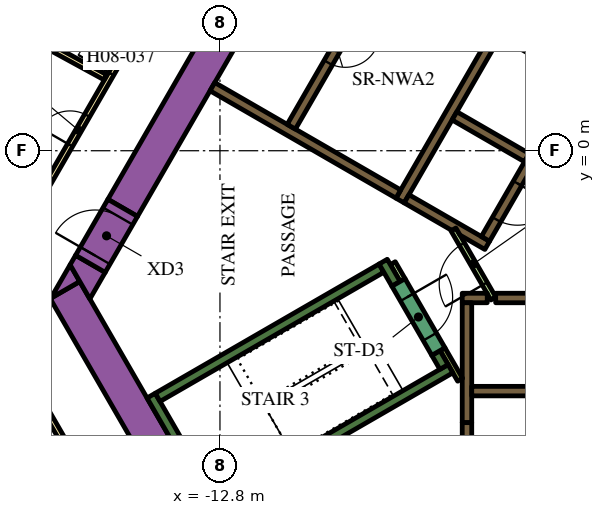
"""IFC4 building model, lengths in metres.
Left out: names, types, materials, properties, quantities, classifications, styles, units other than length and angle.
Written with IfcOpenShell. Run it as: python <this file> out.ifc"""

import sys

from ifc_helpers import new_model, si_unit, direction, frame, frame_2d, origin, place, context, subcontext, project, spatial, polyline, rectangle, outline, extrude, element, fill, save


model = new_model("IFC4")
c1 = context("Model", 3, precision=1e-05, world=origin(), true_north=direction((0.0, 1.0)))
c2 = subcontext(c1, "Body", "Model", "MODEL_VIEW")
j1 = project(units=[si_unit("LENGTHUNIT", "METRE"), si_unit("PLANEANGLEUNIT", "RADIAN")], contexts=[c1])
p1 = place(None, origin())
s1 = spatial("IfcSite", under=j1, at=p1, CompositionType="ELEMENT")
p2 = place(p1, origin())
s2 = spatial("IfcBuilding", under=s1, at=p2, CompositionType="ELEMENT")
p3 = place(p2, frame((0.0, 0.0, 107.1)))
s3 = spatial("IfcBuildingStorey", under=s2, at=p3, CompositionType="ELEMENT", Elevation=107.1)
p4 = place(p3, frame((-15.36, -1.503, 0.0), z_axis=(0.0, 0.0, 1.0), x_axis=(0.50000389221, 0.866023156604, 0.0)))
e1 = element("IfcWall", 1, at=p4, inside=s3, PredefinedType="SOLIDWALL", context=c2, shape_type="SweptSolid", body=[
    extrude(rectangle(XDim=21.0, YDim=0.9, at=frame_2d((10.5, 0.0))), origin(), (0.0, 0.0, 1.0), 3.9),
])
p5 = place(p3, frame((-12.134, -11.883, 0.0), z_axis=(0.0, 0.0, 1.0), x_axis=(-0.500005339912, 0.866022320763, 0.0)))
e2 = element("IfcWall", 2, at=p5, inside=s3, PredefinedType="SOLIDWALL", context=c2, shape_type="SweptSolid", body=[
    extrude(rectangle(XDim=9.488, YDim=0.9, at=frame_2d((4.744, 0.0))), origin(), (0.0, 0.0, 1.0), 3.9),
])
p6 = place(p3, origin())
e3 = element("IfcWall", 3, at=p6, inside=s3, PredefinedType="SOLIDWALL", context=c2, shape_type="SweptSolid", body=[
    extrude(outline(polyline([(-16.489, -3.44), (-17.251, -3.88), (-16.743, -3.0), (-16.489, -3.44)])), origin(), (0.0, 0.0, 1.0), 3.9),
])
e4 = element("IfcWall", 4, at=p6, inside=s3, PredefinedType="SOLIDWALL", context=c2, shape_type="SweptSolid", body=[
    extrude(outline(polyline([(-15.82, -3.201), (-16.223, -3.9), (-16.743, -3.0), (-16.599, -2.751), (-15.82, -3.201)])), origin(), (0.0, 0.0, 1.0), 3.9),
])
p7 = place(p3, frame((-12.885, -9.431, 0.0), z_axis=(0.0, 0.0, 1.0), x_axis=(-0.500020560727, 0.866013532718, 0.0)))
e5 = element("IfcWall", 5, at=p7, inside=s3, PredefinedType="SOLIDWALL", context=c2, shape_type="SweptSolid", body=[
    extrude(rectangle(XDim=3.45, YDim=0.25, at=frame_2d((1.725, 0.0))), origin(), (0.0, 0.0, 1.0), 3.9),
])
p8 = place(p3, frame((-14.44, -6.49, 0.0), z_axis=(0.0, 0.0, 1.0), x_axis=(0.866022966069, 0.500004222222, 0.0)))
e6 = element("IfcWall", 6, at=p8, inside=s3, PredefinedType="SOLIDWALL", context=c2, shape_type="SweptSolid", body=[
    extrude(rectangle(XDim=6.8, YDim=0.25, at=frame_2d((3.4, 0.0))), origin(), (0.0, 0.0, 1.0), 3.9),
])
p9 = place(p3, frame((-8.168, -3.503, 0.0), z_axis=(0.0, 0.0, 1.0), x_axis=(-0.499952099219, 0.866053057547, 0.0)))
e7 = element("IfcWall", 7, at=p9, inside=s3, PredefinedType="SOLIDWALL", context=c2, shape_type="SweptSolid", body=[
    extrude(rectangle(XDim=0.675, YDim=0.25, at=frame_2d((0.337, 0.0))), origin(), (0.0, 0.0, 1.0), 3.9),
])
p10 = place(p3, frame((-12.84, -9.261, 0.0), z_axis=(0.0, 0.0, 1.0), x_axis=(0.866016039709, 0.500016218704, 0.0)))
e8 = element("IfcWall", 8, at=p10, inside=s3, PredefinedType="SOLIDWALL", context=c2, shape_type="SweptSolid", body=[
    extrude(rectangle(XDim=7.05, YDim=0.25, at=frame_2d((3.525, 0.0))), origin(), (0.0, 0.0, 1.0), 3.9),
])
p11 = place(p3, frame((-6.905, -5.69, 0.0), z_axis=(0.0, 0.0, 1.0), x_axis=(-0.500402024738, 0.865793170242, 0.0)))
e9 = element("IfcWall", 9, at=p11, inside=s3, PredefinedType="SOLIDWALL", context=c2, shape_type="SweptSolid", body=[
    extrude(rectangle(XDim=0.425, YDim=0.25, at=frame_2d((0.212, 0.0))), origin(), (0.0, 0.0, 1.0), 3.9),
])
p12 = place(p3, frame((-5.545, -3.875, 0.0), z_axis=(0.0, 0.0, 1.0), x_axis=(1.0, 0.0, 0.0)))
e10 = element("IfcWall", 10, at=p12, inside=s3, PredefinedType="SOLIDWALL", context=c2, shape_type="SweptSolid", body=[
    extrude(rectangle(XDim=11.97, YDim=0.25, at=frame_2d((5.985, 0.0))), origin(), (0.0, 0.0, 1.0), 3.9),
])
p13 = place(p3, frame((-6.425, -3.875, 0.0), z_axis=(0.0, 0.0, 1.0), x_axis=(1.0, 0.0, 0.0)))
e11 = element("IfcWall", 11, at=p13, inside=s3, PredefinedType="SOLIDWALL", context=c2, shape_type="SweptSolid", body=[
    extrude(rectangle(XDim=0.658, YDim=0.25, at=frame_2d((0.329, 0.0))), origin(), (0.0, 0.0, 1.0), 3.9),
])
p14 = place(p3, frame((-6.3, -4.0, 0.0), z_axis=(0.0, 0.0, 1.0), x_axis=(0.0, -1.0, 0.0)))
e12 = element("IfcWall", 12, at=p14, inside=s3, PredefinedType="SOLIDWALL", context=c2, shape_type="SweptSolid", body=[
    extrude(rectangle(XDim=3.154, YDim=0.25, at=frame_2d((1.577, 0.0))), origin(), (0.0, 0.0, 1.0), 3.9),
])
p15 = place(p3, frame((-8.06, -1.311, 0.0), z_axis=(0.0, 0.0, 1.0), x_axis=(0.50000273126, 0.866023826885, 0.0)))
e13 = element("IfcWall", 13, at=p15, inside=s3, PredefinedType="SOLIDWALL", context=c2, shape_type="SweptSolid", body=[
    extrude(rectangle(XDim=10.33, YDim=0.25, at=frame_2d((5.165, 0.0))), origin(), (0.0, 0.0, 1.0), 3.9),
])
for number, where, z_axis, x_axis in (
    (14, (-5.369, 3.1, 0.0), (0.0, 0.0, 1.0), (0.866, -0.5, 0.0)),
    (15, (-4.724, -0.182, 0.0), (0.0, 0.0, 1.0), (-0.866, 0.5, 0.0)),
):
    element("IfcWall", number, at=place(p3, frame(where, z_axis=z_axis, x_axis=x_axis)), inside=s3, PredefinedType="SOLIDWALL", context=c2, shape_type="SweptSolid", body=[
        extrude(rectangle(XDim=2.2, YDim=0.25, at=frame_2d((1.1, 0.0))), origin(), (0.0, 0.0, 1.0), 3.9),
    ])
e16 = element("IfcWall", 16, at=p6, inside=s3, PredefinedType="SOLIDWALL", context=c2, shape_type="SweptSolid", body=[
    extrude(outline(polyline([(-5.922, -2.257), (-5.922, -2.257), (-5.705, -2.382), (-5.83, -2.598), (-6.483, -2.221), (-6.591, -2.033), (-6.591, -2.033), (-6.7, -2.096), (-7.952, -1.373), (-7.827, -1.156), (-5.922, -2.257)])), origin(), (0.0, 0.0, 1.0), 3.9),
])
p16 = place(p3, frame((-8.106, -1.14, 0.0), z_axis=(0.0, 0.0, 1.0), x_axis=(-0.866000643155, 0.500042884217, 0.0)))
e17 = element("IfcWall", 17, at=p16, inside=s3, PredefinedType="SOLIDWALL", context=c2, shape_type="SweptSolid", body=[
    extrude(rectangle(XDim=5.65, YDim=0.25, at=frame_2d((2.825, 0.0))), origin(), (0.0, 0.0, 1.0), 3.9),
])
p17 = place(p3, frame((-6.48, -6.027, 0.0), z_axis=(0.0, 0.0, 1.0), x_axis=(-0.499927229454, 0.866067413802, 0.0)))
e18 = element("IfcWall", 18, at=p17, inside=s3, PredefinedType="PARTITIONING", context=c2, shape_type="SweptSolid", body=[
    extrude(rectangle(XDim=0.929, YDim=0.15, at=frame_2d((0.464, 0.0))), origin(), (0.0, 0.0, 1.0), 3.9),
])
p18 = place(p3, frame((-8.252, -2.958, 0.0), z_axis=(0.0, 0.0, 1.0), x_axis=(0.500174715838, -0.865924508047, 0.0)))
e19 = element("IfcWall", 19, at=p18, inside=s3, PredefinedType="PARTITIONING", context=c2, shape_type="SweptSolid", body=[
    extrude(rectangle(XDim=0.514, YDim=0.15, at=frame_2d((0.257, 0.0))), origin(), (0.0, 0.0, 1.0), 2.75),
])
p19 = place(p3, frame((-6.175, -6.325, 0.0), z_axis=(0.0, 0.0, 1.0), x_axis=(1.0, 0.0, 0.0)))
e20 = element("IfcWall", 20, at=p19, inside=s3, PredefinedType="SOLIDWALL", context=c2, shape_type="SweptSolid", body=[
    extrude(rectangle(XDim=12.35, YDim=0.25, at=frame_2d((6.175, 0.0))), origin(), (0.0, 0.0, 1.0), 3.9),
])
p20 = place(p19, frame((3.205, 0.0, 0.0)))
e21 = element("IfcOpeningElement", 21, at=p20, cuts=e20, PredefinedType="OPENING", context=c2, shape_type="SweptSolid", body=[
    extrude(rectangle(XDim=0.9, YDim=2.1, at=frame_2d((0.45, 1.05))), frame((0.0, 0.135, 0.0), z_axis=(0.0, -1.0, 0.0), x_axis=(1.0, 0.0, 0.0)), (0.0, 0.0, 1.0), 0.27),
])
p21 = place(p19, frame((8.145, 0.0, 0.0)))
e22 = element("IfcOpeningElement", 22, at=p21, cuts=e20, PredefinedType="OPENING", context=c2, shape_type="SweptSolid", body=[
    extrude(rectangle(XDim=1.1, YDim=2.1, at=frame_2d((0.55, 1.05))), frame((0.0, 0.135, 0.0), z_axis=(0.0, -1.0, 0.0), x_axis=(1.0, 0.0, 0.0)), (0.0, 0.0, 1.0), 0.27),
])
p22 = place(p19, frame((10.665, 0.0, 0.0)))
e23 = element("IfcOpeningElement", 23, at=p22, cuts=e20, PredefinedType="OPENING", context=c2, shape_type="SweptSolid", body=[
    extrude(rectangle(XDim=1.1, YDim=2.1, at=frame_2d((0.55, 1.05))), frame((0.0, 0.135, 0.0), z_axis=(0.0, -1.0, 0.0), x_axis=(1.0, 0.0, 0.0)), (0.0, 0.0, 1.0), 0.27),
])
p23 = place(p3, frame((-6.008, 9.144, 0.0), z_axis=(0.0, 0.0, 1.0), x_axis=(-0.500006956611, -0.866021387346, 0.0)))
e24 = element("IfcWall", 24, at=p23, inside=s3, PredefinedType="SOLIDWALL", context=c2, shape_type="SweptSolid", body=[
    extrude(rectangle(XDim=9.83, YDim=0.25, at=frame_2d((4.915, 0.0))), origin(), (0.0, 0.0, 1.0), 3.9),
])
p24 = place(p23, frame((6.985, 0.0, 0.0)))
e25 = element("IfcOpeningElement", 25, at=p24, cuts=e24, PredefinedType="OPENING", context=c2, shape_type="SweptSolid", body=[
    extrude(rectangle(XDim=0.9, YDim=2.1, at=frame_2d((0.45, 1.05))), frame((0.0, 0.135, 0.0), z_axis=(0.0, -1.0, 0.0), x_axis=(1.0, 0.0, 0.0)), (0.0, 0.0, 1.0), 0.27),
])
p25 = place(p3, frame((-0.898, 6.194, 0.0), z_axis=(0.0, 0.0, 1.0), x_axis=(-0.499996202215, -0.866027596426, 0.0)))
e26 = element("IfcWall", 26, at=p25, inside=s3, PredefinedType="SOLIDWALL", context=c2, shape_type="SweptSolid", body=[
    extrude(rectangle(XDim=9.83, YDim=0.25, at=frame_2d((4.915, 0.0))), origin(), (0.0, 0.0, 1.0), 3.9),
])
p26 = place(p25, frame((0.585, 0.0, 0.0)))
e27 = element("IfcOpeningElement", 27, at=p26, cuts=e26, PredefinedType="OPENING", context=c2, shape_type="SweptSolid", body=[
    extrude(rectangle(XDim=1.1, YDim=2.1, at=frame_2d((0.55, 1.05))), frame((0.0, 0.135, 0.0), z_axis=(0.0, -1.0, 0.0), x_axis=(1.0, 0.0, 0.0)), (0.0, 0.0, 1.0), 0.27),
])
p27 = place(p25, frame((3.105, 0.0, 0.0)))
e28 = element("IfcOpeningElement", 28, at=p27, cuts=e26, PredefinedType="OPENING", context=c2, shape_type="SweptSolid", body=[
    extrude(rectangle(XDim=1.1, YDim=2.1, at=frame_2d((0.55, 1.05))), frame((0.0, 0.135, 0.0), z_axis=(0.0, -1.0, 0.0), x_axis=(1.0, 0.0, 0.0)), (0.0, 0.0, 1.0), 0.27),
])
p28 = place(p25, frame((5.625, 0.0, 0.0)))
e29 = element("IfcOpeningElement", 29, at=p28, cuts=e26, PredefinedType="OPENING", context=c2, shape_type="SweptSolid", body=[
    extrude(rectangle(XDim=1.1, YDim=2.1, at=frame_2d((0.55, 1.05))), frame((0.0, 0.135, 0.0), z_axis=(0.0, -1.0, 0.0), x_axis=(1.0, 0.0, 0.0)), (0.0, 0.0, 1.0), 0.27),
])
p29 = place(p25, frame((8.145, 0.0, 0.0)))
e30 = element("IfcOpeningElement", 30, at=p29, cuts=e26, PredefinedType="OPENING", context=c2, shape_type="SweptSolid", body=[
    extrude(rectangle(XDim=1.1, YDim=2.1, at=frame_2d((0.55, 1.05))), frame((0.0, 0.135, 0.0), z_axis=(0.0, -1.0, 0.0), x_axis=(1.0, 0.0, 0.0)), (0.0, 0.0, 1.0), 0.27),
])
p30 = place(p3, frame((-8.103, -3.466, 0.0), z_axis=(0.0, 0.0, 1.0), x_axis=(0.500078061341, -0.865980330357, 0.0)))
e31 = element("IfcWall", 31, at=p30, inside=s3, PredefinedType="SOLIDWALL", context=c2, shape_type="SweptSolid", body=[
    extrude(rectangle(XDim=2.1, YDim=0.4, at=frame_2d((1.05, 0.0))), origin(), (0.0, 0.0, 1.0), 3.9),
])
p31 = place(p30, frame((0.45, 0.0, 0.0)))
e32 = element("IfcOpeningElement", 32, at=p31, cuts=e31, PredefinedType="OPENING", context=c2, shape_type="SweptSolid", body=[
    extrude(rectangle(XDim=1.2, YDim=2.1, at=frame_2d((0.6, 1.05))), frame((0.0, 0.21, 0.0), z_axis=(0.0, -1.0, 0.0), x_axis=(1.0, 0.0, 0.0)), (0.0, 0.0, 1.0), 0.42),
])
p32 = place(p3, frame((-6.3, -7.154, 0.0), z_axis=(0.0, 0.0, 1.0), x_axis=(0.0, -1.0, 0.0)))
e33 = element("IfcWall", 33, at=p32, inside=s3, PredefinedType="SOLIDWALL", context=c2, shape_type="SweptSolid", body=[
    extrude(rectangle(XDim=1.8, YDim=0.25, at=frame_2d((0.9, 0.0))), origin(), (0.0, 0.0, 1.0), 3.9),
])
p33 = place(p32, frame((0.45, 0.0, 0.0)))
e34 = element("IfcOpeningElement", 34, at=p33, cuts=e33, PredefinedType="OPENING", context=c2, shape_type="SweptSolid", body=[
    extrude(rectangle(XDim=0.9, YDim=2.1, at=frame_2d((0.45, 1.05))), frame((0.0, 0.135, 0.0), z_axis=(0.0, -1.0, 0.0), x_axis=(1.0, 0.0, 0.0)), (0.0, 0.0, 1.0), 0.27),
])
p34 = place(p3, frame((-5.606, -3.89, 0.0), z_axis=(0.0, 0.0, 1.0), x_axis=(-0.500027713859, 0.866009402589, 0.0)))
e35 = element("IfcWall", 35, at=p34, inside=s3, PredefinedType="PARTITIONING", context=c2, shape_type="SweptSolid", body=[
    extrude(rectangle(XDim=2.1, YDim=0.15, at=frame_2d((1.05, 0.0))), origin(), (0.0, 0.0, 1.0), 2.75),
])
p35 = place(p34, frame((0.45, 0.0, 0.0)))
e36 = element("IfcOpeningElement", 36, at=p35, cuts=e35, PredefinedType="OPENING", context=c2, shape_type="SweptSolid", body=[
    extrude(rectangle(XDim=1.2, YDim=2.1, at=frame_2d((0.6, 1.05))), frame((0.0, 0.085, 0.0), z_axis=(0.0, -1.0, 0.0), x_axis=(1.0, 0.0, 0.0)), (0.0, 0.0, 1.0), 0.17),
])
p36 = place(p3, frame((-16.209, -2.976, 0.0), z_axis=(0.0, 0.0, 1.0), x_axis=(0.499954529098, 0.86605165483, 0.0)))
e37 = element("IfcWall", 37, at=p36, inside=s3, PredefinedType="SOLIDWALL", context=c2, shape_type="SweptSolid", body=[
    extrude(rectangle(XDim=1.7, YDim=0.9, at=frame_2d((0.85, 0.0))), origin(), (0.0, 0.0, 1.0), 3.9),
])
p37 = place(p36, frame((0.25, 0.0, 0.0)))
e38 = element("IfcOpeningElement", 38, at=p37, cuts=e37, PredefinedType="OPENING", context=c2, shape_type="SweptSolid", body=[
    extrude(rectangle(XDim=1.2, YDim=2.1, at=frame_2d((0.6, 1.05))), frame((0.0, 0.46, 0.0), z_axis=(0.0, -1.0, 0.0), x_axis=(1.0, 0.0, 0.0)), (0.0, 0.0, 1.0), 0.92),
])
p38 = place(p3, frame((-19.081, -3.9, 0.0), z_axis=(0.0, 0.0, 1.0), x_axis=(0.499998313975, 0.866026377209, 0.0)))
e39 = element("IfcWall", 39, at=p38, inside=s3, PredefinedType="PARTITIONING", context=c2, shape_type="SweptSolid", body=[
    extrude(rectangle(XDim=25.766, YDim=0.15, at=frame_2d((12.883, 0.0))), origin(), (0.0, 0.0, 1.0), 2.75),
])
p39 = place(p38, frame((19.306, 0.0, 0.0)))
e40 = element("IfcOpeningElement", 40, at=p39, cuts=e39, PredefinedType="OPENING", context=c2, shape_type="SweptSolid", body=[
    extrude(rectangle(XDim=1.0, YDim=2.1, at=frame_2d((0.5, 1.05))), frame((0.0, 0.085, 0.0), z_axis=(0.0, -1.0, 0.0), x_axis=(1.0, 0.0, 0.0)), (0.0, 0.0, 1.0), 0.17),
])
p40 = place(p38, frame((18.0, 0.0, 0.0)))
e41 = element("IfcOpeningElement", 41, at=p40, cuts=e39, PredefinedType="OPENING", context=c2, shape_type="SweptSolid", body=[
    extrude(rectangle(XDim=1.0, YDim=2.1, at=frame_2d((0.5, 1.05))), frame((0.0, 0.085, 0.0), z_axis=(0.0, -1.0, 0.0), x_axis=(1.0, 0.0, 0.0)), (0.0, 0.0, 1.0), 0.17),
])
p41 = place(p38, frame((6.838, 0.0, 0.0)))
e42 = element("IfcOpeningElement", 42, at=p41, cuts=e39, PredefinedType="OPENING", context=c2, shape_type="SweptSolid", body=[
    extrude(rectangle(XDim=1.0, YDim=2.1, at=frame_2d((0.5, 1.05))), frame((0.0, 0.085, 0.0), z_axis=(0.0, -1.0, 0.0), x_axis=(1.0, 0.0, 0.0)), (0.0, 0.0, 1.0), 0.17),
])
p42 = place(p38, frame((4.674, 0.0, 0.0)))
e43 = element("IfcOpeningElement", 43, at=p42, cuts=e39, PredefinedType="OPENING", context=c2, shape_type="SweptSolid", body=[
    extrude(rectangle(XDim=0.9, YDim=2.1, at=frame_2d((0.45, 1.05))), frame((0.0, 0.085, 0.0), z_axis=(0.0, -1.0, 0.0), x_axis=(1.0, 0.0, 0.0)), (0.0, 0.0, 1.0), 0.17),
])
p43 = place(p38, frame((0.18, 0.0, 0.0)))
e44 = element("IfcOpeningElement", 44, at=p43, cuts=e39, PredefinedType="OPENING", context=c2, shape_type="SweptSolid", body=[
    extrude(rectangle(XDim=1.0, YDim=2.1, at=frame_2d((0.5, 1.05))), frame((0.0, 0.085, 0.0), z_axis=(0.0, -1.0, 0.0), x_axis=(1.0, 0.0, 0.0)), (0.0, 0.0, 1.0), 0.17),
])
p44 = place(p3, frame((-16.412, -8.523, 0.0), z_axis=(0.0, 0.0, 1.0), x_axis=(-0.500001929737, 0.866024289647, 0.0)))
e45 = element("IfcWall", 45, at=p44, inside=s3, PredefinedType="PARTITIONING", context=c2, shape_type="SweptSolid", body=[
    extrude(rectangle(XDim=5.268, YDim=0.15, at=frame_2d((2.634, 0.0))), origin(), (0.0, 0.0, 1.0), 2.75),
])
p45 = place(p3, frame((-26.591, -3.122, 0.0), z_axis=(0.0, 0.0, 1.0), x_axis=(0.893766213273, -0.448533115847, 0.0)))
e46 = element("IfcWall", 46, at=p45, inside=s3, PredefinedType="PARTITIONING", context=c2, shape_type="SweptSolid", body=[
    extrude(rectangle(XDim=10.875, YDim=0.15, at=frame_2d((5.438, 0.0))), origin(), (0.0, 0.0, 1.0), 2.75),
])
p46 = place(p3, frame((-21.614, 5.102, 0.0), z_axis=(0.0, 0.0, 1.0), x_axis=(0.877484555087, -0.479604895287, 0.0)))
e47 = element("IfcWall", 47, at=p46, inside=s3, PredefinedType="PARTITIONING", context=c2, shape_type="SweptSolid", body=[
    extrude(rectangle(XDim=6.611, YDim=0.15, at=frame_2d((3.306, 0.0))), origin(), (0.0, 0.0, 1.0), 2.75),
])
p47 = place(p24, origin())
e48 = element("IfcDoor", 48, at=p47, inside=s3, OperationType="SINGLE_SWING_LEFT", PredefinedType="DOOR", context=c2, shape_type="SweptSolid", body=[
    extrude(rectangle(XDim=0.9, YDim=2.1, at=frame_2d((0.45, 1.05))), frame((0.0, 0.025, 0.0), z_axis=(0.0, -1.0, 0.0), x_axis=(1.0, 0.0, 0.0)), (0.0, 0.0, 1.0), 0.05),
])
fill(e25, e48)
p48 = place(p29, origin())
e49 = element("IfcDoor", 49, at=p48, inside=s3, OperationType="DOUBLE_DOOR_SLIDING", PredefinedType="DOOR", context=c2, shape_type="SweptSolid", body=[
    extrude(rectangle(XDim=1.1, YDim=2.1, at=frame_2d((0.55, 1.05))), frame((0.0, 0.025, 0.0), z_axis=(0.0, -1.0, 0.0), x_axis=(1.0, 0.0, 0.0)), (0.0, 0.0, 1.0), 0.05),
])
fill(e30, e49)
p49 = place(p31, origin())
e50 = element("IfcDoor", 50, at=p49, inside=s3, OperationType="SINGLE_SWING_LEFT", PredefinedType="DOOR", context=c2, shape_type="SweptSolid", body=[
    extrude(rectangle(XDim=1.2, YDim=2.1, at=frame_2d((0.6, 1.05))), frame((0.0, 0.025, 0.0), z_axis=(0.0, -1.0, 0.0), x_axis=(1.0, 0.0, 0.0)), (0.0, 0.0, 1.0), 0.05),
])
fill(e32, e50)
p50 = place(p35, origin())
e51 = element("IfcDoor", 51, at=p50, inside=s3, OperationType="SINGLE_SWING_LEFT", PredefinedType="DOOR", context=c2, shape_type="SweptSolid", body=[
    extrude(rectangle(XDim=1.2, YDim=2.1, at=frame_2d((0.6, 1.05))), frame((0.0, 0.025, 0.0), z_axis=(0.0, -1.0, 0.0), x_axis=(1.0, 0.0, 0.0)), (0.0, 0.0, 1.0), 0.05),
])
fill(e36, e51)
p51 = place(p37, origin())
e52 = element("IfcDoor", 52, at=p51, inside=s3, OperationType="SINGLE_SWING_LEFT", PredefinedType="DOOR", context=c2, shape_type="SweptSolid", body=[
    extrude(rectangle(XDim=1.2, YDim=2.1, at=frame_2d((0.6, 1.05))), frame((0.0, 0.025, 0.0), z_axis=(0.0, -1.0, 0.0), x_axis=(1.0, 0.0, 0.0)), (0.0, 0.0, 1.0), 0.05),
])
fill(e38, e52)
p52 = place(p41, origin())
e53 = element("IfcDoor", 53, at=p52, inside=s3, OperationType="SINGLE_SWING_LEFT", PredefinedType="DOOR", context=c2, shape_type="SweptSolid", body=[
    extrude(rectangle(XDim=1.0, YDim=2.1, at=frame_2d((0.5, 1.05))), frame((0.0, 0.025, 0.0), z_axis=(0.0, -1.0, 0.0), x_axis=(1.0, 0.0, 0.0)), (0.0, 0.0, 1.0), 0.05),
])
fill(e42, e53)
p53 = place(p42, origin())
e54 = element("IfcDoor", 54, at=p53, inside=s3, OperationType="SINGLE_SWING_RIGHT", PredefinedType="DOOR", context=c2, shape_type="SweptSolid", body=[
    extrude(rectangle(XDim=0.9, YDim=2.1, at=frame_2d((0.45, 1.05))), frame((0.0, 0.025, 0.0), z_axis=(0.0, -1.0, 0.0), x_axis=(1.0, 0.0, 0.0)), (0.0, 0.0, 1.0), 0.05),
])
fill(e43, e54)
save(model, sys.argv[1])
